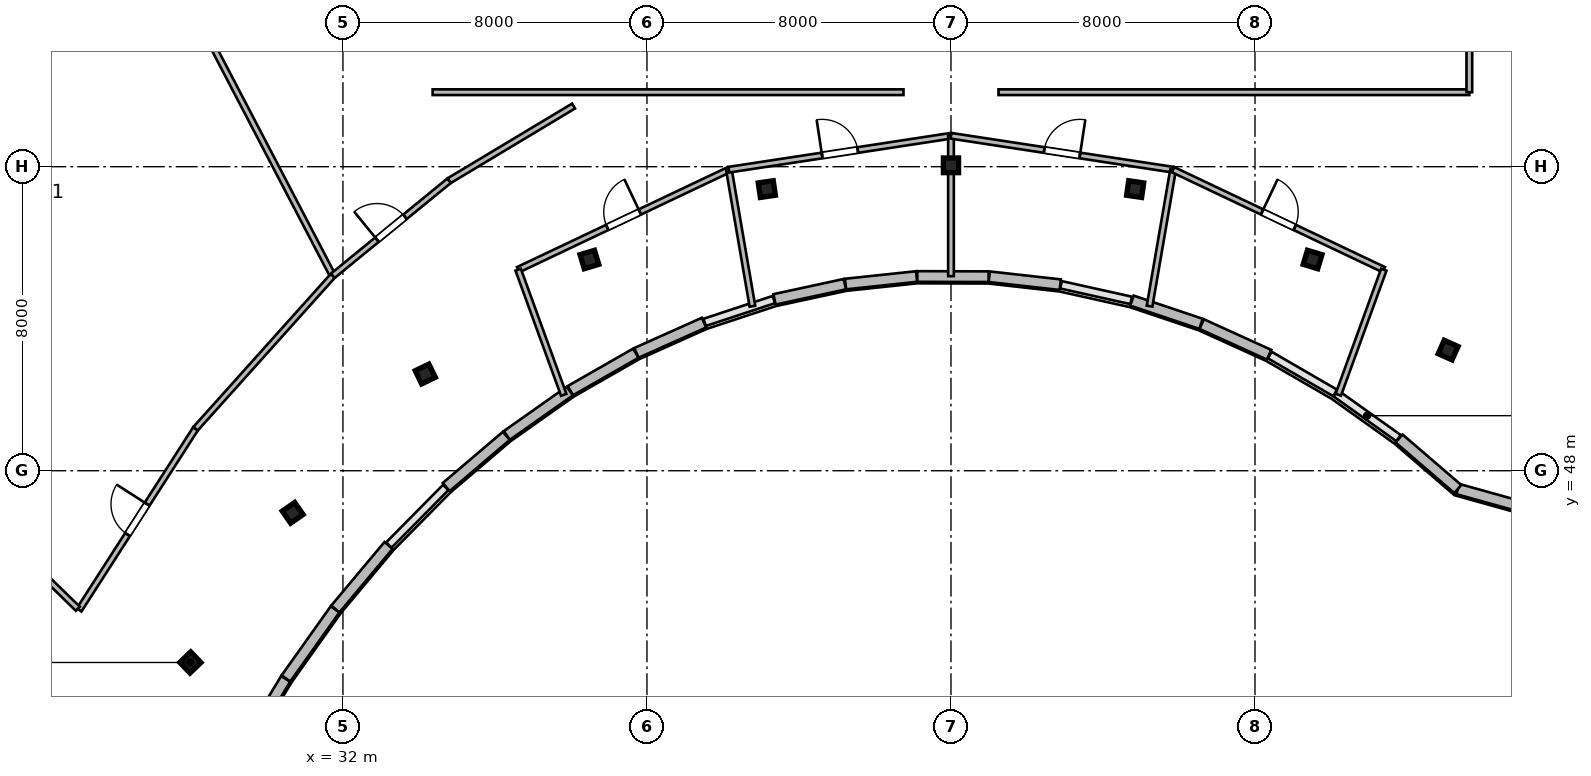
"""IFC4 building model, lengths in metres.
Left out: names, types, materials, properties, quantities, classifications, styles, units other than length and angle.
Written with IfcOpenShell. Run it as: python <this file> out.ifc"""

import sys

from ifc_helpers import new_model, si_unit, direction, frame, frame_2d, origin, origin_2d, place, context, subcontext, project, spatial, rectangle, i_section, extrude, source, transform, mapped, element, fill, save


model = new_model("IFC4")
c1 = context("Model", 3, precision=1e-05, world=origin(), true_north=direction((0.0, 1.0)))
c2 = subcontext(c1, "Body", "Model", "MODEL_VIEW")
j1 = project(units=[si_unit("LENGTHUNIT", "METRE"), si_unit("PLANEANGLEUNIT", "RADIAN")], contexts=[c1])
p1 = place(None, origin())
s1 = spatial("IfcSite", under=j1, at=p1, CompositionType="ELEMENT")
p2 = place(p1, origin())
s2 = spatial("IfcBuilding", under=s1, at=p2, CompositionType="ELEMENT")
p3 = place(p2, frame((0.0, 0.0, 271.8)))
s3 = spatial("IfcBuildingStorey", under=s2, at=p3, CompositionType="ELEMENT", Elevation=271.8)
m1 = source(origin(), c2, "Body", "SweptSolid", [
    extrude(i_section(OverallWidth=0.399, OverallDepth=0.387, WebThickness=0.021, FlangeThickness=0.033, at=origin_2d()), origin(), (0.0, 0.0, 1.0), 3.9),
])
for number, where, z_axis, x_axis in (
    (1, (27.985, 42.955, 0.0), (0.0, 0.0, 1.0), (-0.691, 0.723, 0.0)),
    (2, (30.677, 46.892, 0.0), (0.0, 0.0, 1.0), (-0.571, 0.821, 0.0)),
    (3, (34.166, 50.545, 0.0), (0.0, 0.0, 1.0), (-0.436, 0.9, 0.0)),
    (4, (38.485, 53.558, 0.0), (0.0, 0.0, 1.0), (-0.289, 0.957, 0.0)),
    (5, (43.154, 55.411, 0.0), (0.0, 0.0, 1.0), (-0.143, 0.99, 0.0)),
    (6, (48.0, 56.036, 0.0), (0.0, 0.0, 1.0), (0.0, 1.0, 0.0)),
    (7, (52.846, 55.411, 0.0), (0.0, 0.0, 1.0), (0.143, 0.99, 0.0)),
    (8, (57.515, 53.558, 0.0), (0.0, 0.0, 1.0), (0.289, 0.957, 0.0)),
    (9, (61.082, 51.175, 0.0), (0.0, 0.0, 1.0), (0.409, 0.912, 0.0)),
):
    element("IfcColumn", number, at=place(p3, frame(where, z_axis=z_axis, x_axis=x_axis)), inside=s3, PredefinedType="COLUMN", context=c2, shape_type="MappedRepresentation", body=[
        mapped(m1, transform((0.0, 0.0, 0.0), scale=1.0)),
    ])
m2 = source(origin(), c2, "Body", "SweptSolid", [
    extrude(rectangle(XDim=4.749, YDim=0.28, at=frame_2d((2.374, 0.0))), origin(), (0.0, 0.0, 1.0), 3.64),
])
p4 = place(p3, frame((65.91, 46.242, 0.0), z_axis=(0.0, 0.0, 1.0), x_axis=(-0.963210849911, 0.268746829961, 0.0)))
e10 = element("IfcWall", 10, at=p4, inside=s3, PredefinedType="SOLIDWALL", context=c2, shape_type="MappedRepresentation", body=[
    mapped(m2, transform((0.0, 0.0, 0.0), scale=1.0)),
])
p5 = place(p4, frame((0.16, 0.0, 0.95)))
e11 = element("IfcOpeningElement", 11, at=p5, cuts=e10, PredefinedType="OPENING", context=c2, shape_type="SweptSolid", body=[
    extrude(rectangle(XDim=2.2, YDim=2.1, at=frame_2d((1.1, 1.05))), frame((0.0, 0.15, 0.0), z_axis=(0.0, -1.0, 0.0), x_axis=(1.0, 0.0, 0.0)), (0.0, 0.0, 1.0), 0.3),
])
m3 = source(origin(), c2, "Body", "SweptSolid", [
    extrude(rectangle(XDim=2.04, YDim=0.28, at=frame_2d((1.02, 0.0))), origin(), (0.0, 0.0, 1.0), 3.64),
])
p6 = place(p3, frame((61.337, 47.519, 0.0), z_axis=(0.0, 0.0, 1.0), x_axis=(-0.758402847119, 0.651786101019, 0.0)))
e12 = element("IfcWall", 12, at=p6, inside=s3, PredefinedType="SOLIDWALL", context=c2, shape_type="MappedRepresentation", body=[
    mapped(m3, transform((0.0, 0.0, 0.0), scale=1.0)),
])
m4 = source(origin(), c2, "Body", "SweptSolid", [
    extrude(rectangle(XDim=1.95, YDim=0.28, at=frame_2d((0.975, 0.0))), origin(), (0.0, 0.0, 1.0), 3.64),
])
p7 = place(p3, frame((56.372, 51.052, 0.0), z_axis=(0.0, 0.0, 1.0), x_axis=(-0.910507945155, 0.413491574048, 0.0)))
e13 = element("IfcWall", 13, at=p7, inside=s3, PredefinedType="SOLIDWALL", context=c2, shape_type="MappedRepresentation", body=[
    mapped(m4, transform((0.0, 0.0, 0.0), scale=1.0)),
])
m5 = source(origin(), c2, "Body", "SweptSolid", [
    extrude(rectangle(XDim=1.918, YDim=0.28, at=frame_2d((0.959, 0.0))), origin(), (0.0, 0.0, 1.0), 3.64),
])
p8 = place(p3, frame((54.579, 51.865, 0.0), z_axis=(0.0, 0.0, 1.0), x_axis=(-0.947916697588, 0.318518342381, 0.0)))
e14 = element("IfcWall", 14, at=p8, inside=s3, PredefinedType="SOLIDWALL", context=c2, shape_type="MappedRepresentation", body=[
    mapped(m5, transform((0.0, 0.0, 0.0), scale=1.0)),
])
m6 = source(origin(), c2, "Body", "SweptSolid", [
    extrude(rectangle(XDim=1.879, YDim=0.28, at=frame_2d((0.94, 0.0))), origin(), (0.0, 0.0, 1.0), 3.64),
])
p9 = place(p3, frame((50.875, 52.896, 0.0), z_axis=(0.0, 0.0, 1.0), x_axis=(-0.993797887127, 0.111201436782, 0.0)))
e15 = element("IfcWall", 15, at=p9, inside=s3, PredefinedType="SOLIDWALL", context=c2, shape_type="MappedRepresentation", body=[
    mapped(m6, transform((0.0, 0.0, 0.0), scale=1.0)),
])
m7 = source(origin(), c2, "Body", "SweptSolid", [
    extrude(rectangle(XDim=1.874, YDim=0.28, at=frame_2d((0.937, 0.0))), origin(), (0.0, 0.0, 1.0), 3.64),
])
p10 = place(p3, frame((48.988, 53.106, 0.0), z_axis=(0.0, 0.0, 1.0), x_axis=(-0.999995893899, 0.002865690982, 0.0)))
e16 = element("IfcWall", 16, at=p10, inside=s3, PredefinedType="SOLIDWALL", context=c2, shape_type="MappedRepresentation", body=[
    mapped(m7, transform((0.0, 0.0, 0.0), scale=1.0)),
])
m8 = source(origin(), c2, "Body", "SweptSolid", [
    extrude(rectangle(XDim=1.879, YDim=0.28, at=frame_2d((0.939, 0.0))), origin(), (0.0, 0.0, 1.0), 3.64),
])
p11 = place(p3, frame((47.094, 53.11, 0.0), z_axis=(0.0, 0.0, 1.0), x_axis=(-0.994431872813, -0.105381451568, 0.0)))
e17 = element("IfcWall", 17, at=p11, inside=s3, PredefinedType="SOLIDWALL", context=c2, shape_type="MappedRepresentation", body=[
    mapped(m8, transform((0.0, 0.0, 0.0), scale=1.0)),
])
m9 = source(origin(), c2, "Body", "SweptSolid", [
    extrude(rectangle(XDim=1.893, YDim=0.28, at=frame_2d((0.947, 0.0))), origin(), (0.0, 0.0, 1.0), 3.64),
])
p12 = place(p3, frame((45.207, 52.909, 0.0), z_axis=(0.0, 0.0, 1.0), x_axis=(-0.977379595344, -0.21149261596, 0.0)))
e18 = element("IfcWall", 18, at=p12, inside=s3, PredefinedType="SOLIDWALL", context=c2, shape_type="MappedRepresentation", body=[
    mapped(m9, transform((0.0, 0.0, 0.0), scale=1.0)),
])
m10 = source(origin(), c2, "Body", "SweptSolid", [
    extrude(rectangle(XDim=1.948, YDim=0.28, at=frame_2d((0.974, 0.0))), origin(), (0.0, 0.0, 1.0), 3.64),
])
p13 = place(p3, frame((41.501, 51.897, 0.0), z_axis=(0.0, 0.0, 1.0), x_axis=(-0.912712483043, -0.408602402461, 0.0)))
e19 = element("IfcWall", 19, at=p13, inside=s3, PredefinedType="SOLIDWALL", context=c2, shape_type="MappedRepresentation", body=[
    mapped(m10, transform((0.0, 0.0, 0.0), scale=1.0)),
])
m11 = source(origin(), c2, "Body", "SweptSolid", [
    extrude(rectangle(XDim=1.986, YDim=0.28, at=frame_2d((0.993, 0.0))), origin(), (0.0, 0.0, 1.0), 3.64),
])
p14 = place(p3, frame((39.708, 51.093, 0.0), z_axis=(0.0, 0.0, 1.0), x_axis=(-0.867940364671, -0.496668423976, 0.0)))
e20 = element("IfcWall", 20, at=p14, inside=s3, PredefinedType="SOLIDWALL", context=c2, shape_type="MappedRepresentation", body=[
    mapped(m11, transform((0.0, 0.0, 0.0), scale=1.0)),
])
m12 = source(origin(), c2, "Body", "SweptSolid", [
    extrude(rectangle(XDim=2.03, YDim=0.28, at=frame_2d((1.015, 0.0))), origin(), (0.0, 0.0, 1.0), 3.64),
])
p15 = place(p3, frame((37.969, 50.097, 0.0), z_axis=(0.0, 0.0, 1.0), x_axis=(-0.816987864272, -0.576654861796, 0.0)))
e21 = element("IfcWall", 21, at=p15, inside=s3, PredefinedType="SOLIDWALL", context=c2, shape_type="MappedRepresentation", body=[
    mapped(m12, transform((0.0, 0.0, 0.0), scale=1.0)),
])
m13 = source(origin(), c2, "Body", "SweptSolid", [
    extrude(rectangle(XDim=2.078, YDim=0.28, at=frame_2d((1.039, 0.0))), origin(), (0.0, 0.0, 1.0), 3.64),
])
p16 = place(p3, frame((36.298, 48.917, 0.0), z_axis=(0.0, 0.0, 1.0), x_axis=(-0.761475215802, -0.648194026291, 0.0)))
e22 = element("IfcWall", 22, at=p16, inside=s3, PredefinedType="SOLIDWALL", context=c2, shape_type="MappedRepresentation", body=[
    mapped(m13, transform((0.0, 0.0, 0.0), scale=1.0)),
])
m14 = source(origin(), c2, "Body", "SweptSolid", [
    extrude(rectangle(XDim=2.18, YDim=0.28, at=frame_2d((1.09, 0.0))), origin(), (0.0, 0.0, 1.0), 3.64),
])
p17 = place(p3, frame((33.2, 46.035, 0.0), z_axis=(0.0, 0.0, 1.0), x_axis=(-0.641835571889, -0.766842290603, 0.0)))
e23 = element("IfcWall", 23, at=p17, inside=s3, PredefinedType="SOLIDWALL", context=c2, shape_type="MappedRepresentation", body=[
    mapped(m14, transform((0.0, 0.0, 0.0), scale=1.0)),
])
m15 = source(origin(), c2, "Body", "SweptSolid", [
    extrude(rectangle(XDim=2.231, YDim=0.28, at=frame_2d((1.116, 0.0))), origin(), (0.0, 0.0, 1.0), 3.64),
])
p18 = place(p3, frame((31.792, 44.352, 0.0), z_axis=(0.0, 0.0, 1.0), x_axis=(-0.579622296598, -0.814885263879, 0.0)))
e24 = element("IfcWall", 24, at=p18, inside=s3, PredefinedType="SOLIDWALL", context=c2, shape_type="MappedRepresentation", body=[
    mapped(m15, transform((0.0, 0.0, 0.0), scale=1.0)),
])
m16 = source(origin(), c2, "Body", "SweptSolid", [
    extrude(rectangle(XDim=2.281, YDim=0.28, at=frame_2d((1.14, 0.0))), origin(), (0.0, 0.0, 1.0), 3.64),
])
p19 = place(p3, frame((30.492, 42.523, 0.0), z_axis=(0.0, 0.0, 1.0), x_axis=(-0.516917942662, -0.856034952881, 0.0)))
e25 = element("IfcWall", 25, at=p19, inside=s3, PredefinedType="SOLIDWALL", context=c2, shape_type="MappedRepresentation", body=[
    mapped(m16, transform((0.0, 0.0, 0.0), scale=1.0)),
])
m17 = source(origin(), c2, "Body", "SweptSolid", [
    extrude(rectangle(XDim=6.137, YDim=0.15, at=frame_2d((3.069, 0.0))), origin(), (0.0, 0.0, 1.0), 3.64),
])
p20 = place(p3, frame((36.611, 53.29, 0.0), z_axis=(0.0, 0.0, 1.0), x_axis=(0.903442784804, 0.428708682657, 0.0)))
e26 = element("IfcWall", 26, at=p20, inside=s3, PredefinedType="PARTITIONING", context=c2, shape_type="MappedRepresentation", body=[
    mapped(m17, transform((0.0, 0.0, 0.0), scale=1.0)),
])
p21 = place(p20, frame((2.594, 0.0, 0.0)))
e27 = element("IfcOpeningElement", 27, at=p21, cuts=e26, PredefinedType="OPENING", context=c2, shape_type="SweptSolid", body=[
    extrude(rectangle(XDim=0.95, YDim=2.1, at=frame_2d((0.475, 1.05))), frame((0.0, 0.085, 0.0), z_axis=(0.0, -1.0, 0.0), x_axis=(1.0, 0.0, 0.0)), (0.0, 0.0, 1.0), 0.17),
])
m18 = source(origin(), c2, "Body", "SweptSolid", [
    extrude(rectangle(XDim=3.505, YDim=0.15, at=frame_2d((1.752, 0.0))), origin(), (0.0, 0.0, 1.0), 3.64),
])
p22 = place(p3, frame((37.81, 49.997, 0.0), z_axis=(0.0, 0.0, 1.0), x_axis=(-0.342045087719, 0.939683541394, 0.0)))
e28 = element("IfcWall", 28, at=p22, inside=s3, PredefinedType="PARTITIONING", context=c2, shape_type="MappedRepresentation", body=[
    mapped(m18, transform((0.0, 0.0, 0.0), scale=1.0)),
])
m19 = source(origin(), c2, "Body", "SweptSolid", [
    extrude(rectangle(XDim=3.646, YDim=0.15, at=frame_2d((1.823, 0.0))), origin(), (0.0, 0.0, 1.0), 3.64),
])
p23 = place(p3, frame((42.775, 52.328, 0.0), z_axis=(0.0, 0.0, 1.0), x_axis=(-0.169837393507, 0.985472099943, 0.0)))
e29 = element("IfcWall", 29, at=p23, inside=s3, PredefinedType="PARTITIONING", context=c2, shape_type="MappedRepresentation", body=[
    mapped(m19, transform((0.0, 0.0, 0.0), scale=1.0)),
])
m20 = source(origin(), c2, "Body", "SweptSolid", [
    extrude(rectangle(XDim=5.912, YDim=0.15, at=frame_2d((2.956, 0.0))), origin(), (0.0, 0.0, 1.0), 3.64),
])
p24 = place(p3, frame((42.156, 55.921, 0.0), z_axis=(0.0, 0.0, 1.0), x_axis=(0.98854340791, 0.150936843342, 0.0)))
e30 = element("IfcWall", 30, at=p24, inside=s3, PredefinedType="PARTITIONING", context=c2, shape_type="MappedRepresentation", body=[
    mapped(m20, transform((0.0, 0.0, 0.0), scale=1.0)),
])
p25 = place(p24, frame((2.481, 0.0, 0.0)))
e31 = element("IfcOpeningElement", 31, at=p25, cuts=e30, PredefinedType="OPENING", context=c2, shape_type="SweptSolid", body=[
    extrude(rectangle(XDim=0.95, YDim=2.1, at=frame_2d((0.475, 1.05))), frame((0.0, 0.085, 0.0), z_axis=(0.0, -1.0, 0.0), x_axis=(1.0, 0.0, 0.0)), (0.0, 0.0, 1.0), 0.17),
])
m21 = source(origin(), c2, "Body", "SweptSolid", [
    extrude(rectangle(XDim=3.695, YDim=0.15, at=frame_2d((1.847, 0.0))), origin(), (0.0, 0.0, 1.0), 3.314),
])
p26 = place(p3, frame((48.0, 53.119, 0.0), z_axis=(0.0, 0.0, 1.0), x_axis=(0.0, 1.0, 0.0)))
e32 = element("IfcWall", 32, at=p26, inside=s3, PredefinedType="PARTITIONING", context=c2, shape_type="MappedRepresentation", body=[
    mapped(m21, transform((0.0, 0.0, 0.0), scale=1.0)),
])
p27 = place(p3, frame((48.0, 56.813, 0.0), z_axis=(0.0, 0.0, 1.0), x_axis=(0.98854340791, -0.150936843342, 0.0)))
e33 = element("IfcWall", 33, at=p27, inside=s3, PredefinedType="PARTITIONING", context=c2, shape_type="MappedRepresentation", body=[
    mapped(m20, transform((0.0, 0.0, 0.0), scale=1.0)),
])
p28 = place(p27, frame((2.481, 0.0, 0.0)))
e34 = element("IfcOpeningElement", 34, at=p28, cuts=e33, PredefinedType="OPENING", context=c2, shape_type="SweptSolid", body=[
    extrude(rectangle(XDim=0.95, YDim=2.1, at=frame_2d((0.475, 1.05))), frame((0.0, 0.085, 0.0), z_axis=(0.0, -1.0, 0.0), x_axis=(1.0, 0.0, 0.0)), (0.0, 0.0, 1.0), 0.17),
])
m22 = source(origin(), c2, "Body", "SweptSolid", [
    extrude(rectangle(XDim=3.643, YDim=0.15, at=frame_2d((1.822, 0.0))), origin(), (0.0, 0.0, 1.0), 3.64),
])
p29 = place(p3, frame((53.226, 52.331, 0.0), z_axis=(0.0, 0.0, 1.0), x_axis=(0.169808177553, 0.985477134608, 0.0)))
e35 = element("IfcWall", 35, at=p29, inside=s3, PredefinedType="PARTITIONING", context=c2, shape_type="MappedRepresentation", body=[
    mapped(m22, transform((0.0, 0.0, 0.0), scale=1.0)),
])
p30 = place(p3, frame((53.844, 55.921, 0.0), z_axis=(0.0, 0.0, 1.0), x_axis=(0.903442784804, -0.428708682657, 0.0)))
e36 = element("IfcWall", 36, at=p30, inside=s3, PredefinedType="PARTITIONING", context=c2, shape_type="MappedRepresentation", body=[
    mapped(m17, transform((0.0, 0.0, 0.0), scale=1.0)),
])
p31 = place(p30, frame((2.594, 0.0, 0.0)))
e37 = element("IfcOpeningElement", 37, at=p31, cuts=e36, PredefinedType="OPENING", context=c2, shape_type="SweptSolid", body=[
    extrude(rectangle(XDim=0.95, YDim=2.1, at=frame_2d((0.475, 1.05))), frame((0.0, 0.085, 0.0), z_axis=(0.0, -1.0, 0.0), x_axis=(1.0, 0.0, 0.0)), (0.0, 0.0, 1.0), 0.17),
])
m23 = source(origin(), c2, "Body", "SweptSolid", [
    extrude(rectangle(XDim=3.5, YDim=0.15, at=frame_2d((1.75, 0.0))), origin(), (0.0, 0.0, 1.0), 3.64),
])
p32 = place(p3, frame((58.192, 50.001, 0.0), z_axis=(0.0, 0.0, 1.0), x_axis=(0.342017493073, 0.939693585395, 0.0)))
e38 = element("IfcWall", 38, at=p32, inside=s3, PredefinedType="PARTITIONING", context=c2, shape_type="MappedRepresentation", body=[
    mapped(m23, transform((0.0, 0.0, 0.0), scale=1.0)),
])
m24 = source(origin(), c2, "Body", "SweptSolid", [
    extrude(rectangle(XDim=5.668, YDim=0.15, at=frame_2d((2.834, 0.0))), origin(), (0.0, 0.0, 1.0), 3.64),
])
p33 = place(p3, frame((25.056, 44.337, 0.0), z_axis=(0.0, 0.0, 1.0), x_axis=(0.540868603668, 0.841107099938, 0.0)))
e39 = element("IfcWall", 39, at=p33, inside=s3, PredefinedType="PARTITIONING", context=c2, shape_type="MappedRepresentation", body=[
    mapped(m24, transform((0.0, 0.0, 0.0), scale=1.0)),
])
p34 = place(p33, frame((2.359, 0.0, 0.0)))
e40 = element("IfcOpeningElement", 40, at=p34, cuts=e39, PredefinedType="OPENING", context=c2, shape_type="SweptSolid", body=[
    extrude(rectangle(XDim=0.95, YDim=2.1, at=frame_2d((0.475, 1.05))), frame((0.0, 0.085, 0.0), z_axis=(0.0, -1.0, 0.0), x_axis=(1.0, 0.0, 0.0)), (0.0, 0.0, 1.0), 0.17),
])
m25 = source(origin(), c2, "Body", "SweptSolid", [
    extrude(rectangle(XDim=5.407, YDim=0.15, at=frame_2d((2.704, 0.0))), origin(), (0.0, 0.0, 1.0), 3.64),
])
p35 = place(p3, frame((28.122, 49.105, 0.0), z_axis=(0.0, 0.0, 1.0), x_axis=(0.667851383423, 0.744294652447, 0.0)))
e41 = element("IfcWall", 41, at=p35, inside=s3, PredefinedType="PARTITIONING", context=c2, shape_type="MappedRepresentation", body=[
    mapped(m25, transform((0.0, 0.0, 0.0), scale=1.0)),
])
m26 = source(origin(), c2, "Body", "SweptSolid", [
    extrude(rectangle(XDim=16.154, YDim=0.15, at=frame_2d((8.077, 0.0))), origin(), (0.0, 0.0, 1.0), 3.64),
])
p36 = place(p3, frame((25.024, 44.369, 0.0), z_axis=(0.0, 0.0, 1.0), x_axis=(-0.716519492877, 0.697567069412, 0.0)))
e42 = element("IfcWall", 42, at=p36, inside=s3, PredefinedType="PARTITIONING", context=c2, shape_type="MappedRepresentation", body=[
    mapped(m26, transform((0.0, 0.0, 0.0), scale=1.0)),
])
m27 = source(origin(), c2, "Body", "SweptSolid", [
    extrude(rectangle(XDim=17.75, YDim=0.15, at=frame_2d((8.875, 0.0))), origin(), (0.0, 0.0, 1.0), 3.64),
])
p37 = place(p3, frame((31.71, 53.174, 0.0), z_axis=(0.0, 0.0, 1.0), x_axis=(-0.463130463827, 0.886290118119, 0.0)))
e43 = element("IfcWall", 43, at=p37, inside=s3, PredefinedType="PARTITIONING", context=c2, shape_type="MappedRepresentation", body=[
    mapped(m27, transform((0.0, 0.0, 0.0), scale=1.0)),
])
m28 = source(origin(), c2, "Body", "SweptSolid", [
    extrude(rectangle(XDim=3.954, YDim=0.15, at=frame_2d((1.977, 0.0))), origin(), (0.0, 0.0, 1.0), 3.64),
])
p38 = place(p3, frame((31.733, 53.13, 0.0), z_axis=(0.0, 0.0, 1.0), x_axis=(0.774345047596, 0.632763579281, 0.0)))
e44 = element("IfcWall", 44, at=p38, inside=s3, PredefinedType="PARTITIONING", context=c2, shape_type="MappedRepresentation", body=[
    mapped(m28, transform((0.0, 0.0, 0.0), scale=1.0)),
])
p39 = place(p38, frame((1.502, 0.0, 0.0)))
e45 = element("IfcOpeningElement", 45, at=p39, cuts=e44, PredefinedType="OPENING", context=c2, shape_type="SweptSolid", body=[
    extrude(rectangle(XDim=0.95, YDim=2.1, at=frame_2d((0.475, 1.05))), frame((0.0, 0.085, 0.0), z_axis=(0.0, -1.0, 0.0), x_axis=(1.0, 0.0, 0.0)), (0.0, 0.0, 1.0), 0.17),
])
m29 = source(origin(), c2, "Body", "SweptSolid", [
    extrude(rectangle(XDim=3.817, YDim=0.15, at=frame_2d((1.909, 0.0))), origin(), (0.0, 0.0, 1.0), 3.64),
])
p40 = place(p3, frame((34.795, 55.632, 0.0), z_axis=(0.0, 0.0, 1.0), x_axis=(0.857453418218, 0.514561595522, 0.0)))
e46 = element("IfcWall", 46, at=p40, inside=s3, PredefinedType="PARTITIONING", context=c2, shape_type="MappedRepresentation", body=[
    mapped(m29, transform((0.0, 0.0, 0.0), scale=1.0)),
])
m30 = source(origin(), c2, "Body", "SweptSolid", [
    extrude(rectangle(XDim=12.39, YDim=0.15, at=frame_2d((6.195, 0.0))), origin(), (0.0, 0.0, 1.0), 3.373),
])
for number, where, z_axis, x_axis in (
    (47, (34.36, 57.96, 0.0), (0.0, 0.0, 1.0), (1.0, 0.0, 0.0)),
    (48, (49.25, 57.96, 0.0), (0.0, 0.0, 1.0), (1.0, 0.0, 0.0)),
):
    element("IfcWall", number, at=place(p3, frame(where, z_axis=z_axis, x_axis=x_axis)), inside=s3, PredefinedType="PARTITIONING", context=c2, shape_type="MappedRepresentation", body=[
        mapped(m30, transform((0.0, 0.0, 0.0), scale=1.0)),
    ])
m31 = source(origin(), c2, "Body", "SweptSolid", [
    extrude(rectangle(XDim=5.04, YDim=0.15, at=frame_2d((2.52, 0.0))), origin(), (0.0, 0.0, 1.0), 3.64),
])
p41 = place(p3, frame((61.64, 57.96, 0.0), z_axis=(0.0, 0.0, 1.0), x_axis=(0.0, 1.0, 0.0)))
e49 = element("IfcWall", 49, at=p41, inside=s3, PredefinedType="PARTITIONING", context=c2, shape_type="MappedRepresentation", body=[
    mapped(m31, transform((0.0, 0.0, 0.0), scale=1.0)),
])
p42 = place(p41, frame((1.44, 0.0, 0.0)))
e50 = element("IfcOpeningElement", 50, at=p42, cuts=e49, PredefinedType="OPENING", context=c2, shape_type="SweptSolid", body=[
    extrude(rectangle(XDim=0.95, YDim=2.1, at=frame_2d((0.475, 1.05))), frame((0.0, 0.085, 0.0), z_axis=(0.0, -1.0, 0.0), x_axis=(1.0, 0.0, 0.0)), (0.0, 0.0, 1.0), 0.17),
])
m32 = source(origin(), c2, "Body", "SweptSolid", [
    extrude(rectangle(XDim=0.95, YDim=2.1, at=frame_2d((0.475, 1.05))), frame((0.0, 0.025, 0.0), z_axis=(0.0, -1.0, 0.0), x_axis=(1.0, 0.0, 0.0)), (0.0, 0.0, 1.0), 0.05),
])
p43 = place(p21, origin())
e51 = element("IfcDoor", 51, at=p43, inside=s3, OperationType="SINGLE_SWING_RIGHT", PredefinedType="DOOR", context=c2, shape_type="MappedRepresentation", body=[
    mapped(m32, transform((0.0, 0.0, 0.0), scale=1.0)),
])
fill(e27, e51)
p44 = place(p25, origin())
e52 = element("IfcDoor", 52, at=p44, inside=s3, OperationType="SINGLE_SWING_LEFT", PredefinedType="DOOR", context=c2, shape_type="MappedRepresentation", body=[
    mapped(m32, transform((0.0, 0.0, 0.0), scale=1.0)),
])
fill(e31, e52)
p45 = place(p28, origin())
e53 = element("IfcDoor", 53, at=p45, inside=s3, OperationType="SINGLE_SWING_RIGHT", PredefinedType="DOOR", context=c2, shape_type="MappedRepresentation", body=[
    mapped(m32, transform((0.0, 0.0, 0.0), scale=1.0)),
])
fill(e34, e53)
p46 = place(p31, origin())
e54 = element("IfcDoor", 54, at=p46, inside=s3, OperationType="SINGLE_SWING_LEFT", PredefinedType="DOOR", context=c2, shape_type="MappedRepresentation", body=[
    mapped(m32, transform((0.0, 0.0, 0.0), scale=1.0)),
])
fill(e37, e54)
p47 = place(p34, origin())
e55 = element("IfcDoor", 55, at=p47, inside=s3, OperationType="SINGLE_SWING_RIGHT", PredefinedType="DOOR", context=c2, shape_type="MappedRepresentation", body=[
    mapped(m32, transform((0.0, 0.0, 0.0), scale=1.0)),
])
fill(e40, e55)
p48 = place(p39, origin())
e56 = element("IfcDoor", 56, at=p48, inside=s3, OperationType="SINGLE_SWING_LEFT", PredefinedType="DOOR", context=c2, shape_type="MappedRepresentation", body=[
    mapped(m32, transform((0.0, 0.0, 0.0), scale=1.0)),
])
fill(e45, e56)
save(model, sys.argv[1])
